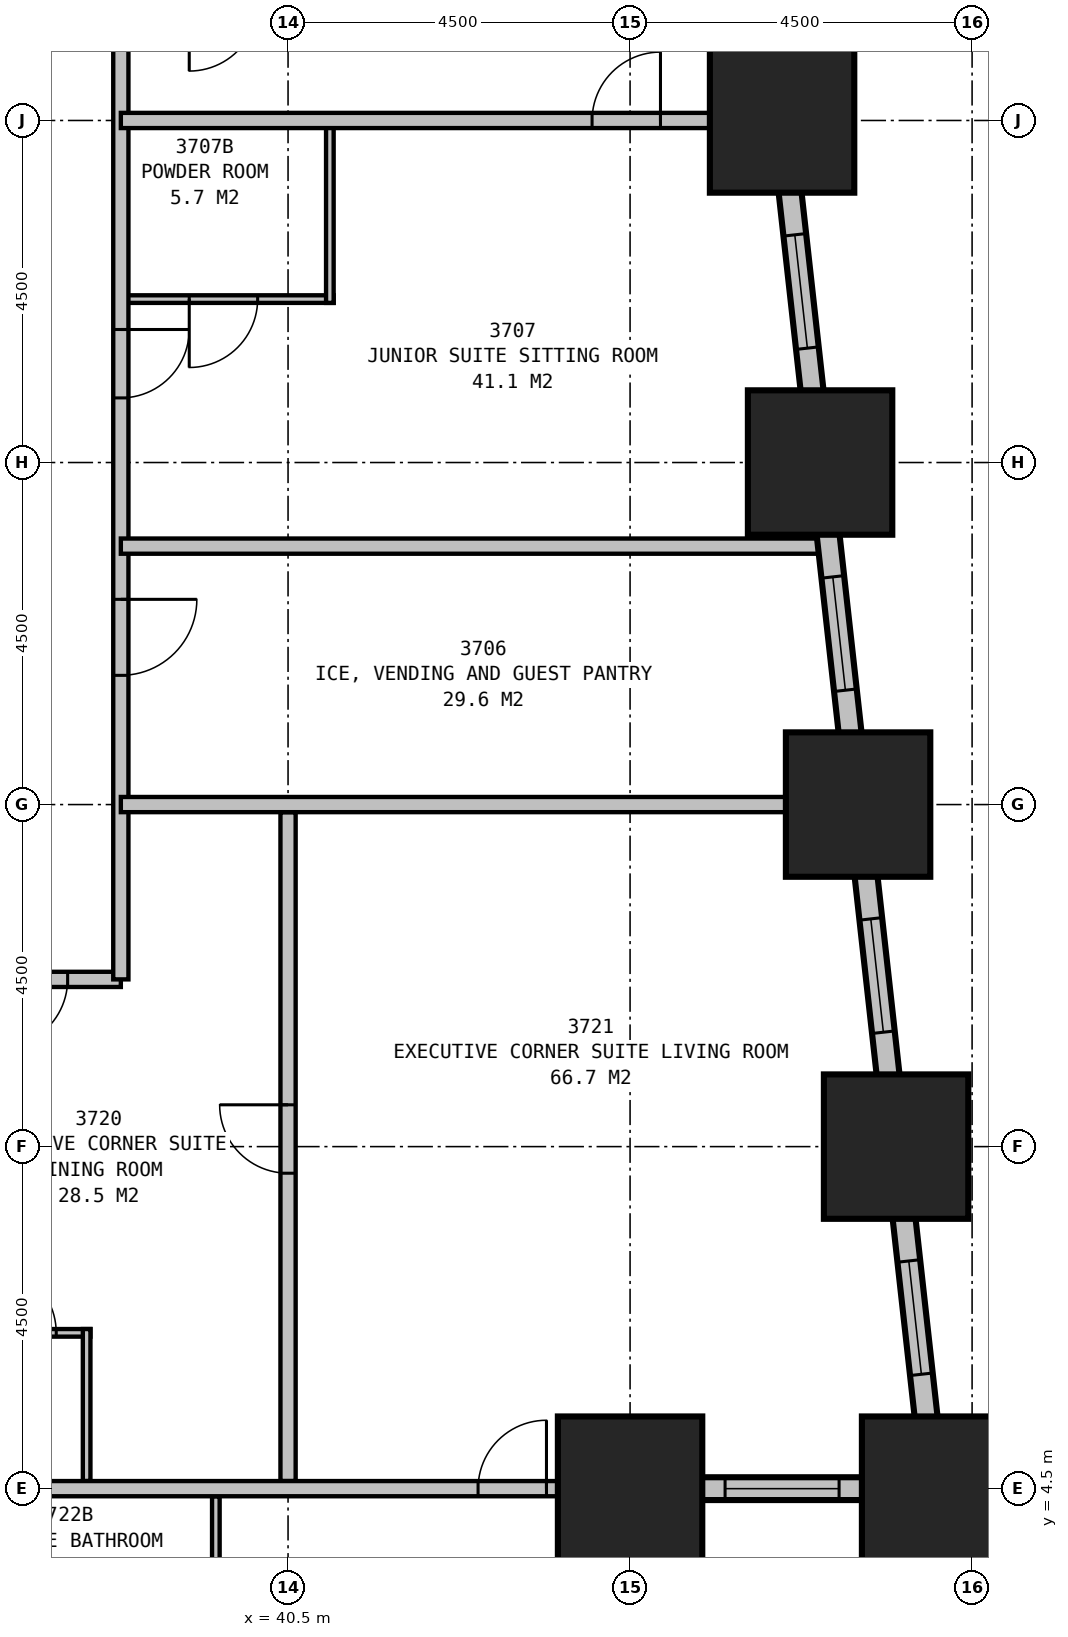
"""IFC4 building model, lengths in metres.
Left out: names, types, materials, properties, quantities, classifications, styles, units other than length and angle.
Written with IfcOpenShell. Run it as: python <this file> out.ifc"""

import sys

from ifc_helpers import new_model, si_unit, direction, frame, frame_2d, origin, origin_2d, place, context, subcontext, project, spatial, rectangle, extrude, element, fill, save


model = new_model("IFC4")
c1 = context("Model", 3, precision=1e-05, world=origin(), true_north=direction((0.0, 1.0)))
c2 = subcontext(c1, "Body", "Model", "MODEL_VIEW")
j1 = project(units=[si_unit("LENGTHUNIT", "METRE"), si_unit("PLANEANGLEUNIT", "RADIAN")], contexts=[c1])
p1 = place(None, origin())
s1 = spatial("IfcSite", under=j1, at=p1, CompositionType="ELEMENT")
p2 = place(p1, origin())
s2 = spatial("IfcBuilding", under=s1, at=p2, CompositionType="ELEMENT")
p3 = place(p2, frame((0.0, 0.0, 142.4)))
s3 = spatial("IfcBuildingStorey", under=s2, at=p3, CompositionType="ELEMENT", Elevation=142.4)
for number, where, z_axis, x_axis in (
    (1, (45.0, 4.5, 0.0), (0.0, 0.0, 1.0), (1.0, 0.0, 0.0)),
    (2, (49.0, 4.5, 0.0), (0.0, 0.0, 1.0), (1.0, 0.0, 0.0)),
    (3, (48.5, 9.0, 0.0), (0.0, 0.0, 1.0), (1.0, 0.0, 0.0)),
    (4, (48.0, 13.5, 0.0), (0.0, 0.0, 1.0), (1.0, 0.0, 0.0)),
    (5, (47.5, 18.0, 0.0), (0.0, 0.0, 1.0), (1.0, 0.0, 0.0)),
    (6, (47.0, 22.5, 0.0), (0.0, 0.0, 1.0), (1.0, 0.0, 0.0)),
):
    element("IfcColumn", number, at=place(p3, frame(where, z_axis=z_axis, x_axis=x_axis)), inside=s3, PredefinedType="COLUMN", context=c2, shape_type="SweptSolid", body=[
        extrude(rectangle(XDim=1.9, YDim=1.9, at=origin_2d()), origin(), (0.0, 0.0, 1.0), 3.5),
    ])
p4 = place(p3, frame((45.0, -0.15, 0.0), z_axis=(0.0, 0.0, 1.0), x_axis=(0.0, 1.0, 0.0)))
e7 = element("IfcWall", 7, at=p4, inside=s3, PredefinedType="STANDARD", context=c2, shape_type="SweptSolid", body=[
    extrude(rectangle(XDim=4.8, YDim=0.3, at=frame_2d((2.4, 0.0))), origin(), (0.0, 0.0, 1.0), 2.1),
])
p5 = place(p4, frame((1.65, 0.0, 0.5)))
e8 = element("IfcOpeningElement", 8, at=p5, cuts=e7, PredefinedType="OPENING", context=c2, shape_type="SweptSolid", body=[
    extrude(rectangle(XDim=1.5, YDim=1.4, at=frame_2d((0.75, 0.7))), frame((0.0, 0.16, 0.0), z_axis=(0.0, -1.0, 0.0), x_axis=(1.0, 0.0, 0.0)), (0.0, 0.0, 1.0), 0.32),
])
p6 = place(p3, frame((44.85, 4.5, 0.0), z_axis=(0.0, 0.0, 1.0), x_axis=(1.0, 0.0, 0.0)))
e9 = element("IfcWall", 9, at=p6, inside=s3, PredefinedType="STANDARD", context=c2, shape_type="SweptSolid", body=[
    extrude(rectangle(XDim=4.3, YDim=0.3, at=frame_2d((2.15, 0.0))), origin(), (0.0, 0.0, 1.0), 2.1),
])
p7 = place(p6, frame((1.4, 0.0, 0.5)))
e10 = element("IfcOpeningElement", 10, at=p7, cuts=e9, PredefinedType="OPENING", context=c2, shape_type="SweptSolid", body=[
    extrude(rectangle(XDim=1.5, YDim=1.4, at=frame_2d((0.75, 0.7))), frame((0.0, 0.16, 0.0), z_axis=(0.0, -1.0, 0.0), x_axis=(1.0, 0.0, 0.0)), (0.0, 0.0, 1.0), 0.32),
])
p8 = place(p3, frame((49.017, 4.351, 0.0), z_axis=(0.0, 0.0, 1.0), x_axis=(-0.110433201132, 0.993883548555, 0.0)))
e11 = element("IfcWall", 11, at=p8, inside=s3, PredefinedType="STANDARD", context=c2, shape_type="SweptSolid", body=[
    extrude(rectangle(XDim=31.994, YDim=0.3, at=frame_2d((15.997, 0.0))), origin(), (0.0, 0.0, 1.0), 2.1),
])
p9 = place(p8, frame((1.664, 0.0, 0.5)))
e12 = element("IfcOpeningElement", 12, at=p9, cuts=e11, PredefinedType="OPENING", context=c2, shape_type="SweptSolid", body=[
    extrude(rectangle(XDim=1.5, YDim=1.4, at=frame_2d((0.75, 0.7))), frame((0.0, 0.16, 0.0), z_axis=(0.0, -1.0, 0.0), x_axis=(1.0, 0.0, 0.0)), (0.0, 0.0, 1.0), 0.32),
])
p10 = place(p8, frame((6.192, 0.0, 0.5)))
e13 = element("IfcOpeningElement", 13, at=p10, cuts=e11, PredefinedType="OPENING", context=c2, shape_type="SweptSolid", body=[
    extrude(rectangle(XDim=1.5, YDim=1.4, at=frame_2d((0.75, 0.7))), frame((0.0, 0.16, 0.0), z_axis=(0.0, -1.0, 0.0), x_axis=(1.0, 0.0, 0.0)), (0.0, 0.0, 1.0), 0.32),
])
p11 = place(p8, frame((10.719, 0.0, 0.5)))
e14 = element("IfcOpeningElement", 14, at=p11, cuts=e11, PredefinedType="OPENING", context=c2, shape_type="SweptSolid", body=[
    extrude(rectangle(XDim=1.5, YDim=1.4, at=frame_2d((0.75, 0.7))), frame((0.0, 0.16, 0.0), z_axis=(0.0, -1.0, 0.0), x_axis=(1.0, 0.0, 0.0)), (0.0, 0.0, 1.0), 0.32),
])
p12 = place(p8, frame((15.247, 0.0, 0.5)))
e15 = element("IfcOpeningElement", 15, at=p12, cuts=e11, PredefinedType="OPENING", context=c2, shape_type="SweptSolid", body=[
    extrude(rectangle(XDim=1.5, YDim=1.4, at=frame_2d((0.75, 0.7))), frame((0.0, 0.16, 0.0), z_axis=(0.0, -1.0, 0.0), x_axis=(1.0, 0.0, 0.0)), (0.0, 0.0, 1.0), 0.32),
])
p13 = place(p8, frame((19.775, 0.0, 0.5)))
e16 = element("IfcOpeningElement", 16, at=p13, cuts=e11, PredefinedType="OPENING", context=c2, shape_type="SweptSolid", body=[
    extrude(rectangle(XDim=1.5, YDim=1.4, at=frame_2d((0.75, 0.7))), frame((0.0, 0.16, 0.0), z_axis=(0.0, -1.0, 0.0), x_axis=(1.0, 0.0, 0.0)), (0.0, 0.0, 1.0), 0.32),
])
p14 = place(p8, frame((24.302, 0.0, 0.5)))
e17 = element("IfcOpeningElement", 17, at=p14, cuts=e11, PredefinedType="OPENING", context=c2, shape_type="SweptSolid", body=[
    extrude(rectangle(XDim=1.5, YDim=1.4, at=frame_2d((0.75, 0.7))), frame((0.0, 0.16, 0.0), z_axis=(0.0, -1.0, 0.0), x_axis=(1.0, 0.0, 0.0)), (0.0, 0.0, 1.0), 0.32),
])
p15 = place(p8, frame((28.83, 0.0, 0.5)))
e18 = element("IfcOpeningElement", 18, at=p15, cuts=e11, PredefinedType="OPENING", context=c2, shape_type="SweptSolid", body=[
    extrude(rectangle(XDim=1.5, YDim=1.4, at=frame_2d((0.75, 0.7))), frame((0.0, 0.16, 0.0), z_axis=(0.0, -1.0, 0.0), x_axis=(1.0, 0.0, 0.0)), (0.0, 0.0, 1.0), 0.32),
])
p16 = place(p3, frame((11.2, 11.2, 0.0), z_axis=(0.0, 0.0, 1.0), x_axis=(1.0, 0.0, 0.0)))
e19 = element("IfcWall", 19, at=p16, inside=s3, PredefinedType="PARTITIONING", context=c2, shape_type="SweptSolid", body=[
    extrude(rectangle(XDim=27.1, YDim=0.2, at=frame_2d((13.55, 0.0))), origin(), (0.0, 0.0, 1.0), 3.25),
])
p17 = place(p16, frame((4.05, 0.0, 0.0), z_axis=(0.0, 0.0, 1.0), x_axis=(-1.0, 0.0, 0.0)))
e20 = element("IfcOpeningElement", 20, at=p17, cuts=e19, PredefinedType="OPENING", context=c2, shape_type="SweptSolid", body=[
    extrude(rectangle(XDim=0.9, YDim=2.1, at=frame_2d((0.45, 1.05))), frame((0.0, 0.11, 0.0), z_axis=(0.0, -1.0, 0.0), x_axis=(1.0, 0.0, 0.0)), (0.0, 0.0, 1.0), 0.22),
])
p18 = place(p16, frame((12.65, 0.0, 0.0), z_axis=(0.0, 0.0, 1.0), x_axis=(-1.0, 0.0, 0.0)))
e21 = element("IfcOpeningElement", 21, at=p18, cuts=e19, PredefinedType="OPENING", context=c2, shape_type="SweptSolid", body=[
    extrude(rectangle(XDim=1.0, YDim=2.1, at=frame_2d((0.5, 1.05))), frame((0.0, 0.11, 0.0), z_axis=(0.0, -1.0, 0.0), x_axis=(1.0, 0.0, 0.0)), (0.0, 0.0, 1.0), 0.22),
])
p19 = place(p16, frame((19.45, 0.0, 0.0), z_axis=(0.0, 0.0, 1.0), x_axis=(-1.0, 0.0, 0.0)))
e22 = element("IfcOpeningElement", 22, at=p19, cuts=e19, PredefinedType="OPENING", context=c2, shape_type="SweptSolid", body=[
    extrude(rectangle(XDim=0.9, YDim=2.1, at=frame_2d((0.45, 1.05))), frame((0.0, 0.11, 0.0), z_axis=(0.0, -1.0, 0.0), x_axis=(1.0, 0.0, 0.0)), (0.0, 0.0, 1.0), 0.22),
])
p20 = place(p16, frame((1.6, 0.0, 0.0), z_axis=(0.0, 0.0, 1.0), x_axis=(-1.0, 0.0, 0.0)))
e23 = element("IfcOpeningElement", 23, at=p20, cuts=e19, PredefinedType="OPENING", context=c2, shape_type="SweptSolid", body=[
    extrude(rectangle(XDim=0.9, YDim=2.1, at=frame_2d((0.45, 1.05))), frame((0.0, 0.11, 0.0), z_axis=(0.0, -1.0, 0.0), x_axis=(1.0, 0.0, 0.0)), (0.0, 0.0, 1.0), 0.22),
])
p21 = place(p16, frame((26.4, 0.0, 0.0), z_axis=(0.0, 0.0, 1.0), x_axis=(-1.0, 0.0, 0.0)))
e24 = element("IfcOpeningElement", 24, at=p21, cuts=e19, PredefinedType="OPENING", context=c2, shape_type="SweptSolid", body=[
    extrude(rectangle(XDim=0.9, YDim=2.1, at=frame_2d((0.45, 1.05))), frame((0.0, 0.11, 0.0), z_axis=(0.0, -1.0, 0.0), x_axis=(1.0, 0.0, 0.0)), (0.0, 0.0, 1.0), 0.22),
])
p22 = place(p3, frame((38.3, 11.2, 0.0), z_axis=(0.0, 0.0, 1.0), x_axis=(0.0, 1.0, 0.0)))
e25 = element("IfcWall", 25, at=p22, inside=s3, PredefinedType="PARTITIONING", context=c2, shape_type="SweptSolid", body=[
    extrude(rectangle(XDim=18.1, YDim=0.2, at=frame_2d((9.05, 0.0))), origin(), (0.0, 0.0, 1.0), 3.25),
])
p23 = place(p22, frame((5.0, 0.0, 0.0), z_axis=(0.0, 0.0, 1.0), x_axis=(-1.0, 0.0, 0.0)))
e26 = element("IfcOpeningElement", 26, at=p23, cuts=e25, PredefinedType="OPENING", context=c2, shape_type="SweptSolid", body=[
    extrude(rectangle(XDim=1.0, YDim=2.1, at=frame_2d((0.5, 1.05))), frame((0.0, 0.11, 0.0), z_axis=(0.0, -1.0, 0.0), x_axis=(1.0, 0.0, 0.0)), (0.0, 0.0, 1.0), 0.22),
])
p24 = place(p22, frame((8.55, 0.0, 0.0), z_axis=(0.0, 0.0, 1.0), x_axis=(-1.0, 0.0, 0.0)))
e27 = element("IfcOpeningElement", 27, at=p24, cuts=e25, PredefinedType="OPENING", context=c2, shape_type="SweptSolid", body=[
    extrude(rectangle(XDim=0.9, YDim=2.1, at=frame_2d((0.45, 1.05))), frame((0.0, 0.11, 0.0), z_axis=(0.0, -1.0, 0.0), x_axis=(1.0, 0.0, 0.0)), (0.0, 0.0, 1.0), 0.22),
])
p25 = place(p3, frame((38.3, 16.9, 0.0), z_axis=(0.0, 0.0, 1.0), x_axis=(1.0, 0.0, 0.0)))
e28 = element("IfcWall", 28, at=p25, inside=s3, PredefinedType="PARTITIONING", context=c2, shape_type="SweptSolid", body=[
    extrude(rectangle(XDim=9.321, YDim=0.2, at=frame_2d((4.661, 0.0))), origin(), (0.0, 0.0, 1.0), 3.25),
])
p26 = place(p3, frame((38.3, 22.5, 0.0), z_axis=(0.0, 0.0, 1.0), x_axis=(1.0, 0.0, 0.0)))
e29 = element("IfcWall", 29, at=p26, inside=s3, PredefinedType="PARTITIONING", context=c2, shape_type="SweptSolid", body=[
    extrude(rectangle(XDim=8.699, YDim=0.2, at=frame_2d((4.35, 0.0))), origin(), (0.0, 0.0, 1.0), 2.2),
])
p27 = place(p26, frame((6.2, 0.0, 0.0)))
e30 = element("IfcOpeningElement", 30, at=p27, cuts=e29, PredefinedType="OPENING", context=c2, shape_type="SweptSolid", body=[
    extrude(rectangle(XDim=0.9, YDim=2.1, at=frame_2d((0.45, 1.05))), frame((0.0, 0.11, 0.0), z_axis=(0.0, -1.0, 0.0), x_axis=(1.0, 0.0, 0.0)), (0.0, 0.0, 1.0), 0.22),
])
p28 = place(p3, frame((41.05, 20.1, 0.0), z_axis=(0.0, 0.0, 1.0), x_axis=(0.0, 1.0, 0.0)))
e31 = element("IfcWall", 31, at=p28, inside=s3, PredefinedType="PLUMBINGWALL", context=c2, shape_type="SweptSolid", body=[
    extrude(rectangle(XDim=2.4, YDim=0.1, at=frame_2d((1.2, 0.0))), origin(), (0.0, 0.0, 1.0), 3.25),
])
p29 = place(p3, frame((38.3, 20.15, 0.0), z_axis=(0.0, 0.0, 1.0), x_axis=(1.0, 0.0, 0.0)))
e32 = element("IfcWall", 32, at=p29, inside=s3, PredefinedType="PLUMBINGWALL", context=c2, shape_type="SweptSolid", body=[
    extrude(rectangle(XDim=2.8, YDim=0.1, at=frame_2d((1.4, 0.0))), origin(), (0.0, 0.0, 1.0), 3.25),
])
p30 = place(p29, frame((1.8, 0.0, 0.0), z_axis=(0.0, 0.0, 1.0), x_axis=(-1.0, 0.0, 0.0)))
e33 = element("IfcOpeningElement", 33, at=p30, cuts=e32, PredefinedType="OPENING", context=c2, shape_type="SweptSolid", body=[
    extrude(rectangle(XDim=0.9, YDim=2.1, at=frame_2d((0.45, 1.05))), frame((0.0, 0.06, 0.0), z_axis=(0.0, -1.0, 0.0), x_axis=(1.0, 0.0, 0.0)), (0.0, 0.0, 1.0), 0.12),
])
p31 = place(p3, frame((38.3, 13.5, 0.0), z_axis=(0.0, 0.0, 1.0), x_axis=(1.0, 0.0, 0.0)))
e34 = element("IfcWall", 34, at=p31, inside=s3, PredefinedType="PARTITIONING", context=c2, shape_type="SweptSolid", body=[
    extrude(rectangle(XDim=9.921, YDim=0.2, at=frame_2d((4.96, 0.0))), origin(), (0.0, 0.0, 1.0), 1.9),
])
p32 = place(p3, frame((35.9, 4.5, 0.0), z_axis=(0.0, 0.0, 1.0), x_axis=(1.0, 0.0, 0.0)))
e35 = element("IfcWall", 35, at=p32, inside=s3, PredefinedType="PARTITIONING", context=c2, shape_type="SweptSolid", body=[
    extrude(rectangle(XDim=9.1, YDim=0.2, at=frame_2d((4.55, 0.0))), origin(), (0.0, 0.0, 1.0), 3.25),
])
p33 = place(p32, frame((7.1, 0.0, 0.0)))
e36 = element("IfcOpeningElement", 36, at=p33, cuts=e35, PredefinedType="OPENING", context=c2, shape_type="SweptSolid", body=[
    extrude(rectangle(XDim=0.9, YDim=2.1, at=frame_2d((0.45, 1.05))), frame((0.0, 0.11, 0.0), z_axis=(0.0, -1.0, 0.0), x_axis=(1.0, 0.0, 0.0)), (0.0, 0.0, 1.0), 0.22),
])
p34 = place(p3, frame((40.5, 4.6, 0.0), z_axis=(0.0, 0.0, 1.0), x_axis=(0.0, 1.0, 0.0)))
e37 = element("IfcWall", 37, at=p34, inside=s3, PredefinedType="PARTITIONING", context=c2, shape_type="SweptSolid", body=[
    extrude(rectangle(XDim=8.8, YDim=0.2, at=frame_2d((4.4, 0.0))), origin(), (0.0, 0.0, 1.0), 2.2),
])
p35 = place(p34, frame((4.05, 0.0, 0.0)))
e38 = element("IfcOpeningElement", 38, at=p35, cuts=e37, PredefinedType="OPENING", context=c2, shape_type="SweptSolid", body=[
    extrude(rectangle(XDim=0.9, YDim=2.1, at=frame_2d((0.45, 1.05))), frame((0.0, 0.11, 0.0), z_axis=(0.0, -1.0, 0.0), x_axis=(1.0, 0.0, 0.0)), (0.0, 0.0, 1.0), 0.22),
])
p36 = place(p3, frame((37.85, 4.6, 0.0), z_axis=(0.0, 0.0, 1.0), x_axis=(0.0, 1.0, 0.0)))
e39 = element("IfcWall", 39, at=p36, inside=s3, PredefinedType="PLUMBINGWALL", context=c2, shape_type="SweptSolid", body=[
    extrude(rectangle(XDim=2.0, YDim=0.1, at=frame_2d((1.0, 0.0))), origin(), (0.0, 0.0, 1.0), 3.25),
])
p37 = place(p3, frame((36.1, 6.55, 0.0), z_axis=(0.0, 0.0, 1.0), x_axis=(1.0, 0.0, 0.0)))
e40 = element("IfcWall", 40, at=p37, inside=s3, PredefinedType="PLUMBINGWALL", context=c2, shape_type="SweptSolid", body=[
    extrude(rectangle(XDim=1.8, YDim=0.1, at=frame_2d((0.9, 0.0))), origin(), (0.0, 0.0, 1.0), 3.25),
])
p38 = place(p37, frame((0.45, 0.0, 0.0)))
e41 = element("IfcOpeningElement", 41, at=p38, cuts=e40, PredefinedType="OPENING", context=c2, shape_type="SweptSolid", body=[
    extrude(rectangle(XDim=0.9, YDim=2.1, at=frame_2d((0.45, 1.05))), frame((0.0, 0.06, 0.0), z_axis=(0.0, -1.0, 0.0), x_axis=(1.0, 0.0, 0.0)), (0.0, 0.0, 1.0), 0.12),
])
p39 = place(p3, frame((39.55, 4.4, 0.0), z_axis=(0.0, 0.0, 1.0), x_axis=(0.0, -1.0, 0.0)))
e42 = element("IfcWall", 42, at=p39, inside=s3, PredefinedType="PLUMBINGWALL", context=c2, shape_type="SweptSolid", body=[
    extrude(rectangle(XDim=2.3, YDim=0.1, at=frame_2d((1.15, 0.0))), origin(), (0.0, 0.0, 1.0), 3.25),
])
p40 = place(p7, origin())
e43 = element("IfcWindow", 43, at=p40, inside=s3, PartitioningType="SINGLE_PANEL", PredefinedType="WINDOW", context=c2, shape_type="SweptSolid", body=[
    extrude(rectangle(XDim=1.5, YDim=1.4, at=frame_2d((0.75, 0.7))), frame((0.0, 0.03, 0.0), z_axis=(0.0, -1.0, 0.0), x_axis=(1.0, 0.0, 0.0)), (0.0, 0.0, 1.0), 0.06),
])
fill(e10, e43)
p41 = place(p9, origin())
e44 = element("IfcWindow", 44, at=p41, inside=s3, PartitioningType="SINGLE_PANEL", PredefinedType="WINDOW", context=c2, shape_type="SweptSolid", body=[
    extrude(rectangle(XDim=1.5, YDim=1.4, at=frame_2d((0.75, 0.7))), frame((0.0, 0.03, 0.0), z_axis=(0.0, -1.0, 0.0), x_axis=(1.0, 0.0, 0.0)), (0.0, 0.0, 1.0), 0.06),
])
fill(e12, e44)
p42 = place(p10, origin())
e45 = element("IfcWindow", 45, at=p42, inside=s3, PartitioningType="SINGLE_PANEL", PredefinedType="WINDOW", context=c2, shape_type="SweptSolid", body=[
    extrude(rectangle(XDim=1.5, YDim=1.4, at=frame_2d((0.75, 0.7))), frame((0.0, 0.03, 0.0), z_axis=(0.0, -1.0, 0.0), x_axis=(1.0, 0.0, 0.0)), (0.0, 0.0, 1.0), 0.06),
])
fill(e13, e45)
p43 = place(p11, origin())
e46 = element("IfcWindow", 46, at=p43, inside=s3, PartitioningType="SINGLE_PANEL", PredefinedType="WINDOW", context=c2, shape_type="SweptSolid", body=[
    extrude(rectangle(XDim=1.5, YDim=1.4, at=frame_2d((0.75, 0.7))), frame((0.0, 0.03, 0.0), z_axis=(0.0, -1.0, 0.0), x_axis=(1.0, 0.0, 0.0)), (0.0, 0.0, 1.0), 0.06),
])
fill(e14, e46)
p44 = place(p12, origin())
e47 = element("IfcWindow", 47, at=p44, inside=s3, PartitioningType="SINGLE_PANEL", PredefinedType="WINDOW", context=c2, shape_type="SweptSolid", body=[
    extrude(rectangle(XDim=1.5, YDim=1.4, at=frame_2d((0.75, 0.7))), frame((0.0, 0.03, 0.0), z_axis=(0.0, -1.0, 0.0), x_axis=(1.0, 0.0, 0.0)), (0.0, 0.0, 1.0), 0.06),
])
fill(e15, e47)
p45 = place(p21, origin())
e48 = element("IfcDoor", 48, at=p45, inside=s3, OperationType="SINGLE_SWING_RIGHT", PredefinedType="DOOR", context=c2, shape_type="SweptSolid", body=[
    extrude(rectangle(XDim=0.9, YDim=2.1, at=frame_2d((0.45, 1.05))), frame((0.0, 0.025, 0.0), z_axis=(0.0, -1.0, 0.0), x_axis=(1.0, 0.0, 0.0)), (0.0, 0.0, 1.0), 0.05),
])
fill(e24, e48)
p46 = place(p23, origin())
e49 = element("IfcDoor", 49, at=p46, inside=s3, OperationType="SINGLE_SWING_LEFT", PredefinedType="DOOR", context=c2, shape_type="SweptSolid", body=[
    extrude(rectangle(XDim=1.0, YDim=2.1, at=frame_2d((0.5, 1.05))), frame((0.0, 0.025, 0.0), z_axis=(0.0, -1.0, 0.0), x_axis=(1.0, 0.0, 0.0)), (0.0, 0.0, 1.0), 0.05),
])
fill(e26, e49)
p47 = place(p24, origin())
e50 = element("IfcDoor", 50, at=p47, inside=s3, OperationType="SINGLE_SWING_LEFT", PredefinedType="DOOR", context=c2, shape_type="SweptSolid", body=[
    extrude(rectangle(XDim=0.9, YDim=2.1, at=frame_2d((0.45, 1.05))), frame((0.0, 0.025, 0.0), z_axis=(0.0, -1.0, 0.0), x_axis=(1.0, 0.0, 0.0)), (0.0, 0.0, 1.0), 0.05),
])
fill(e27, e50)
p48 = place(p27, origin())
e51 = element("IfcDoor", 51, at=p48, inside=s3, OperationType="SINGLE_SWING_RIGHT", PredefinedType="DOOR", context=c2, shape_type="SweptSolid", body=[
    extrude(rectangle(XDim=0.9, YDim=2.1, at=frame_2d((0.45, 1.05))), frame((0.0, 0.025, 0.0), z_axis=(0.0, -1.0, 0.0), x_axis=(1.0, 0.0, 0.0)), (0.0, 0.0, 1.0), 0.05),
])
fill(e30, e51)
p49 = place(p30, origin())
e52 = element("IfcDoor", 52, at=p49, inside=s3, OperationType="SINGLE_SWING_RIGHT", PredefinedType="DOOR", context=c2, shape_type="SweptSolid", body=[
    extrude(rectangle(XDim=0.9, YDim=2.1, at=frame_2d((0.45, 1.05))), frame((0.0, 0.025, 0.0), z_axis=(0.0, -1.0, 0.0), x_axis=(1.0, 0.0, 0.0)), (0.0, 0.0, 1.0), 0.05),
])
fill(e33, e52)
p50 = place(p33, origin())
e53 = element("IfcDoor", 53, at=p50, inside=s3, OperationType="SINGLE_SWING_RIGHT", PredefinedType="DOOR", context=c2, shape_type="SweptSolid", body=[
    extrude(rectangle(XDim=0.9, YDim=2.1, at=frame_2d((0.45, 1.05))), frame((0.0, 0.025, 0.0), z_axis=(0.0, -1.0, 0.0), x_axis=(1.0, 0.0, 0.0)), (0.0, 0.0, 1.0), 0.05),
])
fill(e36, e53)
p51 = place(p35, origin())
e54 = element("IfcDoor", 54, at=p51, inside=s3, OperationType="SINGLE_SWING_RIGHT", PredefinedType="DOOR", context=c2, shape_type="SweptSolid", body=[
    extrude(rectangle(XDim=0.9, YDim=2.1, at=frame_2d((0.45, 1.05))), frame((0.0, 0.025, 0.0), z_axis=(0.0, -1.0, 0.0), x_axis=(1.0, 0.0, 0.0)), (0.0, 0.0, 1.0), 0.05),
])
fill(e38, e54)
p52 = place(p38, origin())
e55 = element("IfcDoor", 55, at=p52, inside=s3, OperationType="SINGLE_SWING_LEFT", PredefinedType="DOOR", context=c2, shape_type="SweptSolid", body=[
    extrude(rectangle(XDim=0.9, YDim=2.1, at=frame_2d((0.45, 1.05))), frame((0.0, 0.025, 0.0), z_axis=(0.0, -1.0, 0.0), x_axis=(1.0, 0.0, 0.0)), (0.0, 0.0, 1.0), 0.05),
])
fill(e41, e55)
save(model, sys.argv[1])
